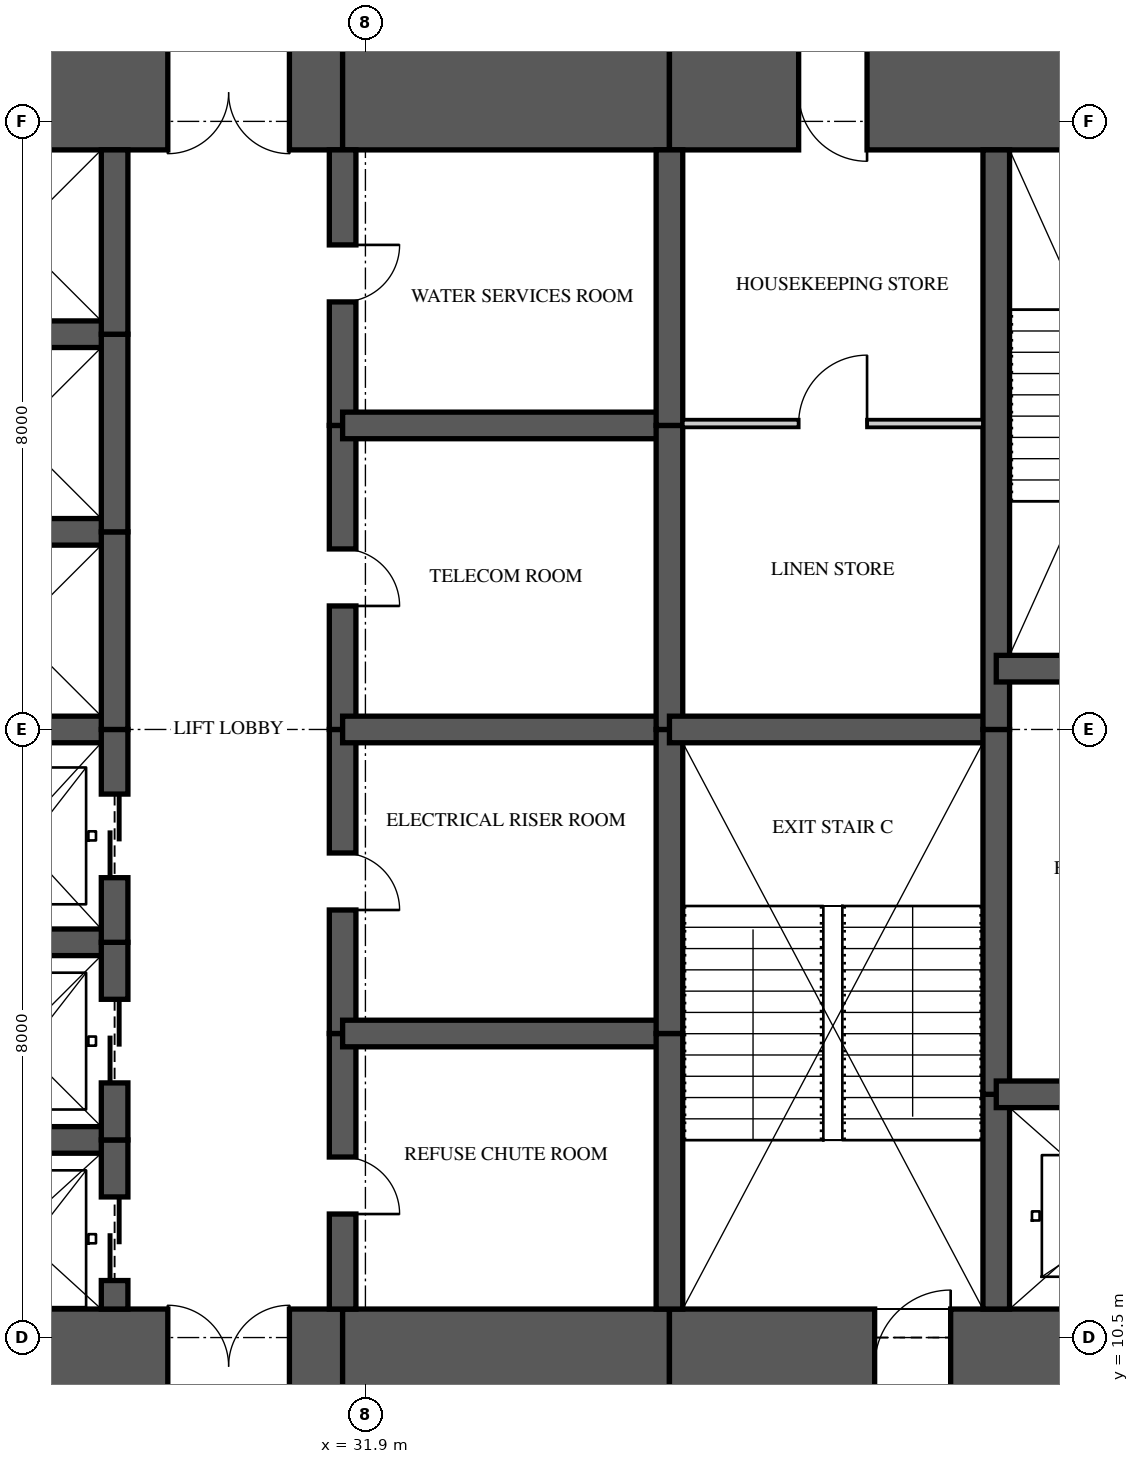
"""IFC4 building model, lengths in metres.
Left out: names, types, materials, properties, quantities, classifications, styles, units other than length and angle.
Written with IfcOpenShell. Run it as: python <this file> out.ifc"""

import sys

from ifc_helpers import new_model, si_unit, direction, frame, frame_2d, origin, place, context, subcontext, project, spatial, rectangle, extrude, element, fill, save


model = new_model("IFC4")
c1 = context("Model", 3, precision=1e-05, world=origin(), true_north=direction((0.0, 1.0)))
c2 = subcontext(c1, "Body", "Model", "MODEL_VIEW")
j1 = project(units=[si_unit("LENGTHUNIT", "METRE"), si_unit("PLANEANGLEUNIT", "RADIAN")], contexts=[c1])
p1 = place(None, origin())
s1 = spatial("IfcSite", under=j1, at=p1, CompositionType="ELEMENT")
p2 = place(p1, origin())
s2 = spatial("IfcBuilding", under=s1, at=p2, CompositionType="ELEMENT")
p3 = place(p2, frame((0.0, 0.0, 101.5)))
s3 = spatial("IfcBuildingStorey", under=s2, at=p3, CompositionType="ELEMENT", Elevation=101.5)
p4 = place(p3, frame((26.0, 10.125, 0.0), z_axis=(0.0, 0.0, 1.0), x_axis=(1.0, 0.0, 0.0)))
e1 = element("IfcWall", 1, at=p4, inside=s3, PredefinedType="SHEAR", context=c2, shape_type="SweptSolid", body=[
    extrude(rectangle(XDim=5.6, YDim=1.5, at=frame_2d((2.8, 0.0))), origin(), (0.0, 0.0, 1.0), 3.35),
])
p5 = place(p4, frame((3.3, 0.0, 0.0)))
e2 = element("IfcOpeningElement", 2, at=p5, cuts=e1, PredefinedType="OPENING", context=c2, shape_type="SweptSolid", body=[
    extrude(rectangle(XDim=1.6, YDim=2.1, at=frame_2d((0.8, 1.05))), frame((0.0, 0.76, 0.0), z_axis=(0.0, -1.0, 0.0), x_axis=(1.0, 0.0, 0.0)), (0.0, 0.0, 1.0), 1.52),
])
p6 = place(p3, frame((31.6, 10.125, 0.0), z_axis=(0.0, 0.0, 1.0), x_axis=(1.0, 0.0, 0.0)))
e3 = element("IfcWall", 3, at=p6, inside=s3, PredefinedType="SHEAR", context=c2, shape_type="SweptSolid", body=[
    extrude(rectangle(XDim=4.3, YDim=1.5, at=frame_2d((2.15, 0.0))), origin(), (0.0, 0.0, 1.0), 3.35),
])
p7 = place(p3, frame((35.9, 10.125, 0.0), z_axis=(0.0, 0.0, 1.0), x_axis=(1.0, 0.0, 0.0)))
e4 = element("IfcWall", 4, at=p7, inside=s3, PredefinedType="SHEAR", context=c2, shape_type="SweptSolid", body=[
    extrude(rectangle(XDim=8.325, YDim=1.5, at=frame_2d((4.163, 0.0))), origin(), (0.0, 0.0, 1.0), 3.35),
])
p8 = place(p7, frame((2.7, 0.0, 0.0)))
e5 = element("IfcOpeningElement", 5, at=p8, cuts=e4, PredefinedType="OPENING", context=c2, shape_type="SweptSolid", body=[
    extrude(rectangle(XDim=1.0, YDim=2.1, at=frame_2d((0.5, 1.05))), frame((0.0, 0.76, 0.0), z_axis=(0.0, -1.0, 0.0), x_axis=(1.0, 0.0, 0.0)), (0.0, 0.0, 1.0), 1.52),
])
p9 = place(p3, frame((44.225, 26.875, 0.0), z_axis=(0.0, 0.0, 1.0), x_axis=(-1.0, 0.0, 0.0)))
e6 = element("IfcWall", 6, at=p9, inside=s3, PredefinedType="SHEAR", context=c2, shape_type="SweptSolid", body=[
    extrude(rectangle(XDim=8.325, YDim=1.5, at=frame_2d((4.163, 0.0))), origin(), (0.0, 0.0, 1.0), 3.35),
])
p10 = place(p9, frame((5.725, 0.0, 0.0)))
e7 = element("IfcOpeningElement", 7, at=p10, cuts=e6, PredefinedType="OPENING", context=c2, shape_type="SweptSolid", body=[
    extrude(rectangle(XDim=0.9, YDim=2.1, at=frame_2d((0.45, 1.05))), frame((0.0, 0.76, 0.0), z_axis=(0.0, -1.0, 0.0), x_axis=(1.0, 0.0, 0.0)), (0.0, 0.0, 1.0), 1.52),
])
p11 = place(p3, frame((35.9, 26.875, 0.0), z_axis=(0.0, 0.0, 1.0), x_axis=(-1.0, 0.0, 0.0)))
e8 = element("IfcWall", 8, at=p11, inside=s3, PredefinedType="SHEAR", context=c2, shape_type="SweptSolid", body=[
    extrude(rectangle(XDim=4.3, YDim=1.5, at=frame_2d((2.15, 0.0))), origin(), (0.0, 0.0, 1.0), 3.35),
])
p12 = place(p3, frame((31.6, 26.875, 0.0), z_axis=(0.0, 0.0, 1.0), x_axis=(-1.0, 0.0, 0.0)))
e9 = element("IfcWall", 9, at=p12, inside=s3, PredefinedType="SHEAR", context=c2, shape_type="SweptSolid", body=[
    extrude(rectangle(XDim=5.6, YDim=1.5, at=frame_2d((2.8, 0.0))), origin(), (0.0, 0.0, 1.0), 3.35),
])
p13 = place(p12, frame((0.7, 0.0, 0.0)))
e10 = element("IfcOpeningElement", 10, at=p13, cuts=e9, PredefinedType="OPENING", context=c2, shape_type="SweptSolid", body=[
    extrude(rectangle(XDim=1.6, YDim=2.1, at=frame_2d((0.8, 1.05))), frame((0.0, 0.76, 0.0), z_axis=(0.0, -1.0, 0.0), x_axis=(1.0, 0.0, 0.0)), (0.0, 0.0, 1.0), 1.52),
])
p14 = place(p3, frame((28.6, 10.875, 0.0), z_axis=(0.0, 0.0, 1.0), x_axis=(0.0, 1.0, 0.0)))
e11 = element("IfcWall", 11, at=p14, inside=s3, PredefinedType="SHEAR", context=c2, shape_type="SweptSolid", body=[
    extrude(rectangle(XDim=2.225, YDim=0.35, at=frame_2d((1.113, 0.0))), origin(), (0.0, 0.0, 1.0), 3.35),
])
p15 = place(p14, frame((0.375, 0.0, 0.0)))
e12 = element("IfcOpeningElement", 12, at=p15, cuts=e11, PredefinedType="OPENING", context=c2, shape_type="SweptSolid", body=[
    extrude(rectangle(XDim=1.1, YDim=2.1, at=frame_2d((0.55, 1.05))), frame((0.0, 0.185, 0.0), z_axis=(0.0, -1.0, 0.0), x_axis=(1.0, 0.0, 0.0)), (0.0, 0.0, 1.0), 0.37),
])
p16 = place(p3, frame((28.6, 13.1, 0.0), z_axis=(0.0, 0.0, 1.0), x_axis=(0.0, 1.0, 0.0)))
e13 = element("IfcWall", 13, at=p16, inside=s3, PredefinedType="SHEAR", context=c2, shape_type="SweptSolid", body=[
    extrude(rectangle(XDim=2.6, YDim=0.35, at=frame_2d((1.3, 0.0))), origin(), (0.0, 0.0, 1.0), 3.35),
])
p17 = place(p16, frame((0.75, 0.0, 0.0)))
e14 = element("IfcOpeningElement", 14, at=p17, cuts=e13, PredefinedType="OPENING", context=c2, shape_type="SweptSolid", body=[
    extrude(rectangle(XDim=1.1, YDim=2.1, at=frame_2d((0.55, 1.05))), frame((0.0, 0.185, 0.0), z_axis=(0.0, -1.0, 0.0), x_axis=(1.0, 0.0, 0.0)), (0.0, 0.0, 1.0), 0.37),
])
p18 = place(p3, frame((28.6, 15.7, 0.0), z_axis=(0.0, 0.0, 1.0), x_axis=(0.0, 1.0, 0.0)))
e15 = element("IfcWall", 15, at=p18, inside=s3, PredefinedType="SHEAR", context=c2, shape_type="SweptSolid", body=[
    extrude(rectangle(XDim=2.8, YDim=0.35, at=frame_2d((1.4, 0.0))), origin(), (0.0, 0.0, 1.0), 3.35),
])
p19 = place(p18, frame((0.85, 0.0, 0.0)))
e16 = element("IfcOpeningElement", 16, at=p19, cuts=e15, PredefinedType="OPENING", context=c2, shape_type="SweptSolid", body=[
    extrude(rectangle(XDim=1.1, YDim=2.1, at=frame_2d((0.55, 1.05))), frame((0.0, 0.185, 0.0), z_axis=(0.0, -1.0, 0.0), x_axis=(1.0, 0.0, 0.0)), (0.0, 0.0, 1.0), 0.37),
])
p20 = place(p3, frame((28.6, 18.5, 0.0), z_axis=(0.0, 0.0, 1.0), x_axis=(0.0, 1.0, 0.0)))
e17 = element("IfcWall", 17, at=p20, inside=s3, PredefinedType="SHEAR", context=c2, shape_type="SweptSolid", body=[
    extrude(rectangle(XDim=2.6, YDim=0.35, at=frame_2d((1.3, 0.0))), origin(), (0.0, 0.0, 1.0), 3.35),
])
p21 = place(p3, frame((28.6, 21.1, 0.0), z_axis=(0.0, 0.0, 1.0), x_axis=(0.0, 1.0, 0.0)))
e18 = element("IfcWall", 18, at=p21, inside=s3, PredefinedType="SHEAR", context=c2, shape_type="SweptSolid", body=[
    extrude(rectangle(XDim=2.6, YDim=0.35, at=frame_2d((1.3, 0.0))), origin(), (0.0, 0.0, 1.0), 3.35),
])
p22 = place(p3, frame((28.6, 23.7, 0.0), z_axis=(0.0, 0.0, 1.0), x_axis=(0.0, 1.0, 0.0)))
e19 = element("IfcWall", 19, at=p22, inside=s3, PredefinedType="SHEAR", context=c2, shape_type="SweptSolid", body=[
    extrude(rectangle(XDim=2.425, YDim=0.35, at=frame_2d((1.212, 0.0))), origin(), (0.0, 0.0, 1.0), 3.35),
])
p23 = place(p3, frame((31.6, 10.875, 0.0), z_axis=(0.0, 0.0, 1.0), x_axis=(0.0, 1.0, 0.0)))
e20 = element("IfcWall", 20, at=p23, inside=s3, PredefinedType="SHEAR", context=c2, shape_type="SweptSolid", body=[
    extrude(rectangle(XDim=3.625, YDim=0.35, at=frame_2d((1.812, 0.0))), origin(), (0.0, 0.0, 1.0), 3.35),
])
p24 = place(p23, frame((1.25, 0.0, 0.0)))
e21 = element("IfcOpeningElement", 21, at=p24, cuts=e20, PredefinedType="OPENING", context=c2, shape_type="SweptSolid", body=[
    extrude(rectangle(XDim=0.75, YDim=2.1, at=frame_2d((0.375, 1.05))), frame((0.0, 0.185, 0.0), z_axis=(0.0, -1.0, 0.0), x_axis=(1.0, 0.0, 0.0)), (0.0, 0.0, 1.0), 0.37),
])
p25 = place(p3, frame((31.6, 14.5, 0.0), z_axis=(0.0, 0.0, 1.0), x_axis=(0.0, 1.0, 0.0)))
e22 = element("IfcWall", 22, at=p25, inside=s3, PredefinedType="SHEAR", context=c2, shape_type="SweptSolid", body=[
    extrude(rectangle(XDim=4.0, YDim=0.35, at=frame_2d((2.0, 0.0))), origin(), (0.0, 0.0, 1.0), 3.35),
])
p26 = place(p25, frame((1.625, 0.0, 0.0)))
e23 = element("IfcOpeningElement", 23, at=p26, cuts=e22, PredefinedType="OPENING", context=c2, shape_type="SweptSolid", body=[
    extrude(rectangle(XDim=0.75, YDim=2.1, at=frame_2d((0.375, 1.05))), frame((0.0, 0.185, 0.0), z_axis=(0.0, -1.0, 0.0), x_axis=(1.0, 0.0, 0.0)), (0.0, 0.0, 1.0), 0.37),
])
p27 = place(p3, frame((31.6, 18.5, 0.0), z_axis=(0.0, 0.0, 1.0), x_axis=(0.0, 1.0, 0.0)))
e24 = element("IfcWall", 24, at=p27, inside=s3, PredefinedType="SHEAR", context=c2, shape_type="SweptSolid", body=[
    extrude(rectangle(XDim=4.0, YDim=0.35, at=frame_2d((2.0, 0.0))), origin(), (0.0, 0.0, 1.0), 3.35),
])
p28 = place(p27, frame((1.625, 0.0, 0.0)))
e25 = element("IfcOpeningElement", 25, at=p28, cuts=e24, PredefinedType="OPENING", context=c2, shape_type="SweptSolid", body=[
    extrude(rectangle(XDim=0.75, YDim=2.1, at=frame_2d((0.375, 1.05))), frame((0.0, 0.185, 0.0), z_axis=(0.0, -1.0, 0.0), x_axis=(1.0, 0.0, 0.0)), (0.0, 0.0, 1.0), 0.37),
])
p29 = place(p3, frame((31.6, 22.5, 0.0), z_axis=(0.0, 0.0, 1.0), x_axis=(0.0, 1.0, 0.0)))
e26 = element("IfcWall", 26, at=p29, inside=s3, PredefinedType="SHEAR", context=c2, shape_type="SweptSolid", body=[
    extrude(rectangle(XDim=3.625, YDim=0.35, at=frame_2d((1.812, 0.0))), origin(), (0.0, 0.0, 1.0), 3.35),
])
p30 = place(p29, frame((1.625, 0.0, 0.0)))
e27 = element("IfcOpeningElement", 27, at=p30, cuts=e26, PredefinedType="OPENING", context=c2, shape_type="SweptSolid", body=[
    extrude(rectangle(XDim=0.75, YDim=2.1, at=frame_2d((0.375, 1.05))), frame((0.0, 0.185, 0.0), z_axis=(0.0, -1.0, 0.0), x_axis=(1.0, 0.0, 0.0)), (0.0, 0.0, 1.0), 0.37),
])
p31 = place(p3, frame((35.9, 10.875, 0.0), z_axis=(0.0, 0.0, 1.0), x_axis=(0.0, 1.0, 0.0)))
e28 = element("IfcWall", 28, at=p31, inside=s3, PredefinedType="SHEAR", context=c2, shape_type="SweptSolid", body=[
    extrude(rectangle(XDim=3.625, YDim=0.35, at=frame_2d((1.812, 0.0))), origin(), (0.0, 0.0, 1.0), 3.35),
])
for number, where, z_axis, x_axis in (
    (29, (35.9, 14.5, 0.0), (0.0, 0.0, 1.0), (0.0, 1.0, 0.0)),
    (30, (35.9, 18.5, 0.0), (0.0, 0.0, 1.0), (0.0, 1.0, 0.0)),
):
    element("IfcWall", number, at=place(p3, frame(where, z_axis=z_axis, x_axis=x_axis)), inside=s3, PredefinedType="SHEAR", context=c2, shape_type="SweptSolid", body=[
        extrude(rectangle(XDim=4.0, YDim=0.35, at=frame_2d((2.0, 0.0))), origin(), (0.0, 0.0, 1.0), 3.35),
    ])
p32 = place(p3, frame((35.9, 22.5, 0.0), z_axis=(0.0, 0.0, 1.0), x_axis=(0.0, 1.0, 0.0)))
e31 = element("IfcWall", 31, at=p32, inside=s3, PredefinedType="SHEAR", context=c2, shape_type="SweptSolid", body=[
    extrude(rectangle(XDim=3.625, YDim=0.35, at=frame_2d((1.812, 0.0))), origin(), (0.0, 0.0, 1.0), 3.35),
])
p33 = place(p3, frame((40.2, 10.875, 0.0), z_axis=(0.0, 0.0, 1.0), x_axis=(0.0, 1.0, 0.0)))
e32 = element("IfcWall", 32, at=p33, inside=s3, PredefinedType="SHEAR", context=c2, shape_type="SweptSolid", body=[
    extrude(rectangle(XDim=2.825, YDim=0.35, at=frame_2d((1.413, 0.0))), origin(), (0.0, 0.0, 1.0), 3.35),
])
p34 = place(p3, frame((40.2, 13.7, 0.0), z_axis=(0.0, 0.0, 1.0), x_axis=(0.0, 1.0, 0.0)))
e33 = element("IfcWall", 33, at=p34, inside=s3, PredefinedType="SHEAR", context=c2, shape_type="SweptSolid", body=[
    extrude(rectangle(XDim=4.8, YDim=0.35, at=frame_2d((2.4, 0.0))), origin(), (0.0, 0.0, 1.0), 3.35),
])
p35 = place(p3, frame((40.2, 18.5, 0.0), z_axis=(0.0, 0.0, 1.0), x_axis=(0.0, 1.0, 0.0)))
e34 = element("IfcWall", 34, at=p35, inside=s3, PredefinedType="SHEAR", context=c2, shape_type="SweptSolid", body=[
    extrude(rectangle(XDim=7.625, YDim=0.35, at=frame_2d((3.812, 0.0))), origin(), (0.0, 0.0, 1.0), 3.35),
])
for number, where, z_axis, x_axis in (
    (35, (26.0, 13.1, 0.0), (0.0, 0.0, 1.0), (1.0, 0.0, 0.0)),
    (36, (26.0, 15.7, 0.0), (0.0, 0.0, 1.0), (1.0, 0.0, 0.0)),
    (37, (26.0, 18.5, 0.0), (0.0, 0.0, 1.0), (1.0, 0.0, 0.0)),
    (38, (26.0, 21.1, 0.0), (0.0, 0.0, 1.0), (1.0, 0.0, 0.0)),
    (39, (26.0, 23.7, 0.0), (0.0, 0.0, 1.0), (1.0, 0.0, 0.0)),
):
    element("IfcWall", number, at=place(p3, frame(where, z_axis=z_axis, x_axis=x_axis)), inside=s3, PredefinedType="SHEAR", context=c2, shape_type="SweptSolid", body=[
        extrude(rectangle(XDim=2.6, YDim=0.35, at=frame_2d((1.3, 0.0))), origin(), (0.0, 0.0, 1.0), 3.35),
    ])
for number, where, z_axis, x_axis in (
    (40, (31.6, 14.5, 0.0), (0.0, 0.0, 1.0), (1.0, 0.0, 0.0)),
    (41, (31.6, 18.5, 0.0), (0.0, 0.0, 1.0), (1.0, 0.0, 0.0)),
    (42, (31.6, 22.5, 0.0), (0.0, 0.0, 1.0), (1.0, 0.0, 0.0)),
):
    element("IfcWall", number, at=place(p3, frame(where, z_axis=z_axis, x_axis=x_axis)), inside=s3, PredefinedType="SHEAR", context=c2, shape_type="SweptSolid", body=[
        extrude(rectangle(XDim=4.3, YDim=0.35, at=frame_2d((2.15, 0.0))), origin(), (0.0, 0.0, 1.0), 3.35),
    ])
p36 = place(p3, frame((35.9, 18.5, 0.0), z_axis=(0.0, 0.0, 1.0), x_axis=(1.0, 0.0, 0.0)))
e43 = element("IfcWall", 43, at=p36, inside=s3, PredefinedType="SHEAR", context=c2, shape_type="SweptSolid", body=[
    extrude(rectangle(XDim=4.3, YDim=0.35, at=frame_2d((2.15, 0.0))), origin(), (0.0, 0.0, 1.0), 3.35),
])
p37 = place(p3, frame((40.2, 13.7, 0.0), z_axis=(0.0, 0.0, 1.0), x_axis=(1.0, 0.0, 0.0)))
e44 = element("IfcWall", 44, at=p37, inside=s3, PredefinedType="SHEAR", context=c2, shape_type="SweptSolid", body=[
    extrude(rectangle(XDim=3.6, YDim=0.35, at=frame_2d((1.8, 0.0))), origin(), (0.0, 0.0, 1.0), 3.35),
])
p38 = place(p37, frame((1.2, 0.0, 0.0)))
e45 = element("IfcOpeningElement", 45, at=p38, cuts=e44, PredefinedType="OPENING", context=c2, shape_type="SweptSolid", body=[
    extrude(rectangle(XDim=1.2, YDim=2.1, at=frame_2d((0.6, 1.05))), frame((0.0, 0.185, 0.0), z_axis=(0.0, -1.0, 0.0), x_axis=(1.0, 0.0, 0.0)), (0.0, 0.0, 1.0), 0.37),
])
p39 = place(p3, frame((40.2, 19.3, 0.0), z_axis=(0.0, 0.0, 1.0), x_axis=(1.0, 0.0, 0.0)))
e46 = element("IfcWall", 46, at=p39, inside=s3, PredefinedType="SHEAR", context=c2, shape_type="SweptSolid", body=[
    extrude(rectangle(XDim=3.6, YDim=0.35, at=frame_2d((1.8, 0.0))), origin(), (0.0, 0.0, 1.0), 3.35),
])
p40 = place(p39, frame((1.3, 0.0, 0.0)))
e47 = element("IfcOpeningElement", 47, at=p40, cuts=e46, PredefinedType="OPENING", context=c2, shape_type="SweptSolid", body=[
    extrude(rectangle(XDim=1.0, YDim=2.1, at=frame_2d((0.5, 1.05))), frame((0.0, 0.185, 0.0), z_axis=(0.0, -1.0, 0.0), x_axis=(1.0, 0.0, 0.0)), (0.0, 0.0, 1.0), 0.37),
])
p41 = place(p3, frame((36.075, 22.525, 0.0), z_axis=(0.0, 0.0, 1.0), x_axis=(1.0, 0.0, 0.0)))
e48 = element("IfcWall", 48, at=p41, inside=s3, PredefinedType="PARTITIONING", context=c2, shape_type="SweptSolid", body=[
    extrude(rectangle(XDim=3.95, YDim=0.1, at=frame_2d((1.975, 0.0))), origin(), (0.0, 0.0, 1.0), 3.11),
])
p42 = place(p41, frame((1.525, 0.0, 0.0)))
e49 = element("IfcOpeningElement", 49, at=p42, cuts=e48, PredefinedType="OPENING", context=c2, shape_type="SweptSolid", body=[
    extrude(rectangle(XDim=0.9, YDim=2.1, at=frame_2d((0.45, 1.05))), frame((0.0, 0.06, 0.0), z_axis=(0.0, -1.0, 0.0), x_axis=(1.0, 0.0, 0.0)), (0.0, 0.0, 1.0), 0.12),
])
p43 = place(p42, origin())
e50 = element("IfcDoor", 50, at=p43, inside=s3, OperationType="SINGLE_SWING_RIGHT", PredefinedType="DOOR", context=c2, shape_type="SweptSolid", body=[
    extrude(rectangle(XDim=0.9, YDim=2.1, at=frame_2d((0.45, 1.05))), frame((0.0, 0.025, 0.0), z_axis=(0.0, -1.0, 0.0), x_axis=(1.0, 0.0, 0.0)), (0.0, 0.0, 1.0), 0.05),
])
fill(e49, e50)
p44 = place(p15, origin())
e51 = element("IfcDoor", 51, at=p44, inside=s3, OperationType="SLIDING_TO_LEFT", PredefinedType="DOOR", context=c2, shape_type="SweptSolid", body=[
    extrude(rectangle(XDim=1.1, YDim=2.1, at=frame_2d((0.55, 1.05))), frame((0.0, 0.025, 0.0), z_axis=(0.0, -1.0, 0.0), x_axis=(1.0, 0.0, 0.0)), (0.0, 0.0, 1.0), 0.05),
])
fill(e12, e51)
p45 = place(p17, origin())
e52 = element("IfcDoor", 52, at=p45, inside=s3, OperationType="SLIDING_TO_LEFT", PredefinedType="DOOR", context=c2, shape_type="SweptSolid", body=[
    extrude(rectangle(XDim=1.1, YDim=2.1, at=frame_2d((0.55, 1.05))), frame((0.0, 0.025, 0.0), z_axis=(0.0, -1.0, 0.0), x_axis=(1.0, 0.0, 0.0)), (0.0, 0.0, 1.0), 0.05),
])
fill(e14, e52)
p46 = place(p19, origin())
e53 = element("IfcDoor", 53, at=p46, inside=s3, OperationType="SLIDING_TO_LEFT", PredefinedType="DOOR", context=c2, shape_type="SweptSolid", body=[
    extrude(rectangle(XDim=1.1, YDim=2.1, at=frame_2d((0.55, 1.05))), frame((0.0, 0.025, 0.0), z_axis=(0.0, -1.0, 0.0), x_axis=(1.0, 0.0, 0.0)), (0.0, 0.0, 1.0), 0.05),
])
fill(e16, e53)
p47 = place(p5, origin())
e54 = element("IfcDoor", 54, at=p47, inside=s3, OperationType="DOUBLE_DOOR_SINGLE_SWING", PredefinedType="DOOR", context=c2, shape_type="SweptSolid", body=[
    extrude(rectangle(XDim=1.6, YDim=2.1, at=frame_2d((0.8, 1.05))), frame((0.0, 0.025, 0.0), z_axis=(0.0, -1.0, 0.0), x_axis=(1.0, 0.0, 0.0)), (0.0, 0.0, 1.0), 0.05),
])
fill(e2, e54)
p48 = place(p13, origin())
e55 = element("IfcDoor", 55, at=p48, inside=s3, OperationType="DOUBLE_DOOR_SINGLE_SWING", PredefinedType="DOOR", context=c2, shape_type="SweptSolid", body=[
    extrude(rectangle(XDim=1.6, YDim=2.1, at=frame_2d((0.8, 1.05))), frame((0.0, 0.025, 0.0), z_axis=(0.0, -1.0, 0.0), x_axis=(1.0, 0.0, 0.0)), (0.0, 0.0, 1.0), 0.05),
])
fill(e10, e55)
p49 = place(p24, frame((0.75, 0.0, 0.0), z_axis=(0.0, 0.0, 1.0), x_axis=(-1.0, 0.0, 0.0)))
e56 = element("IfcDoor", 56, at=p49, inside=s3, OperationType="SINGLE_SWING_RIGHT", PredefinedType="DOOR", context=c2, shape_type="SweptSolid", body=[
    extrude(rectangle(XDim=0.75, YDim=2.1, at=frame_2d((0.375, 1.05))), frame((0.0, 0.025, 0.0), z_axis=(0.0, -1.0, 0.0), x_axis=(1.0, 0.0, 0.0)), (0.0, 0.0, 1.0), 0.05),
])
fill(e21, e56)
p50 = place(p26, frame((0.75, 0.0, 0.0), z_axis=(0.0, 0.0, 1.0), x_axis=(-1.0, 0.0, 0.0)))
e57 = element("IfcDoor", 57, at=p50, inside=s3, OperationType="SINGLE_SWING_RIGHT", PredefinedType="DOOR", context=c2, shape_type="SweptSolid", body=[
    extrude(rectangle(XDim=0.75, YDim=2.1, at=frame_2d((0.375, 1.05))), frame((0.0, 0.025, 0.0), z_axis=(0.0, -1.0, 0.0), x_axis=(1.0, 0.0, 0.0)), (0.0, 0.0, 1.0), 0.05),
])
fill(e23, e57)
p51 = place(p28, frame((0.75, 0.0, 0.0), z_axis=(0.0, 0.0, 1.0), x_axis=(-1.0, 0.0, 0.0)))
e58 = element("IfcDoor", 58, at=p51, inside=s3, OperationType="SINGLE_SWING_RIGHT", PredefinedType="DOOR", context=c2, shape_type="SweptSolid", body=[
    extrude(rectangle(XDim=0.75, YDim=2.1, at=frame_2d((0.375, 1.05))), frame((0.0, 0.025, 0.0), z_axis=(0.0, -1.0, 0.0), x_axis=(1.0, 0.0, 0.0)), (0.0, 0.0, 1.0), 0.05),
])
fill(e25, e58)
p52 = place(p30, frame((0.75, 0.0, 0.0), z_axis=(0.0, 0.0, 1.0), x_axis=(-1.0, 0.0, 0.0)))
e59 = element("IfcDoor", 59, at=p52, inside=s3, OperationType="SINGLE_SWING_LEFT", PredefinedType="DOOR", context=c2, shape_type="SweptSolid", body=[
    extrude(rectangle(XDim=0.75, YDim=2.1, at=frame_2d((0.375, 1.05))), frame((0.0, 0.025, 0.0), z_axis=(0.0, -1.0, 0.0), x_axis=(1.0, 0.0, 0.0)), (0.0, 0.0, 1.0), 0.05),
])
fill(e27, e59)
p53 = place(p8, origin())
e60 = element("IfcDoor", 60, at=p53, inside=s3, OperationType="SINGLE_SWING_RIGHT", PredefinedType="DOOR", context=c2, shape_type="SweptSolid", body=[
    extrude(rectangle(XDim=1.0, YDim=2.1, at=frame_2d((0.5, 1.05))), frame((0.0, 0.025, 0.0), z_axis=(0.0, -1.0, 0.0), x_axis=(1.0, 0.0, 0.0)), (0.0, 0.0, 1.0), 0.05),
])
fill(e5, e60)
p54 = place(p10, origin())
e61 = element("IfcDoor", 61, at=p54, inside=s3, OperationType="SINGLE_SWING_LEFT", PredefinedType="DOOR", context=c2, shape_type="SweptSolid", body=[
    extrude(rectangle(XDim=0.9, YDim=2.1, at=frame_2d((0.45, 1.05))), frame((0.0, 0.47, 0.0), z_axis=(0.0, -1.0, 0.0), x_axis=(1.0, 0.0, 0.0)), (0.0, 0.0, 1.0), 0.8),
])
fill(e7, e61)
save(model, sys.argv[1])
